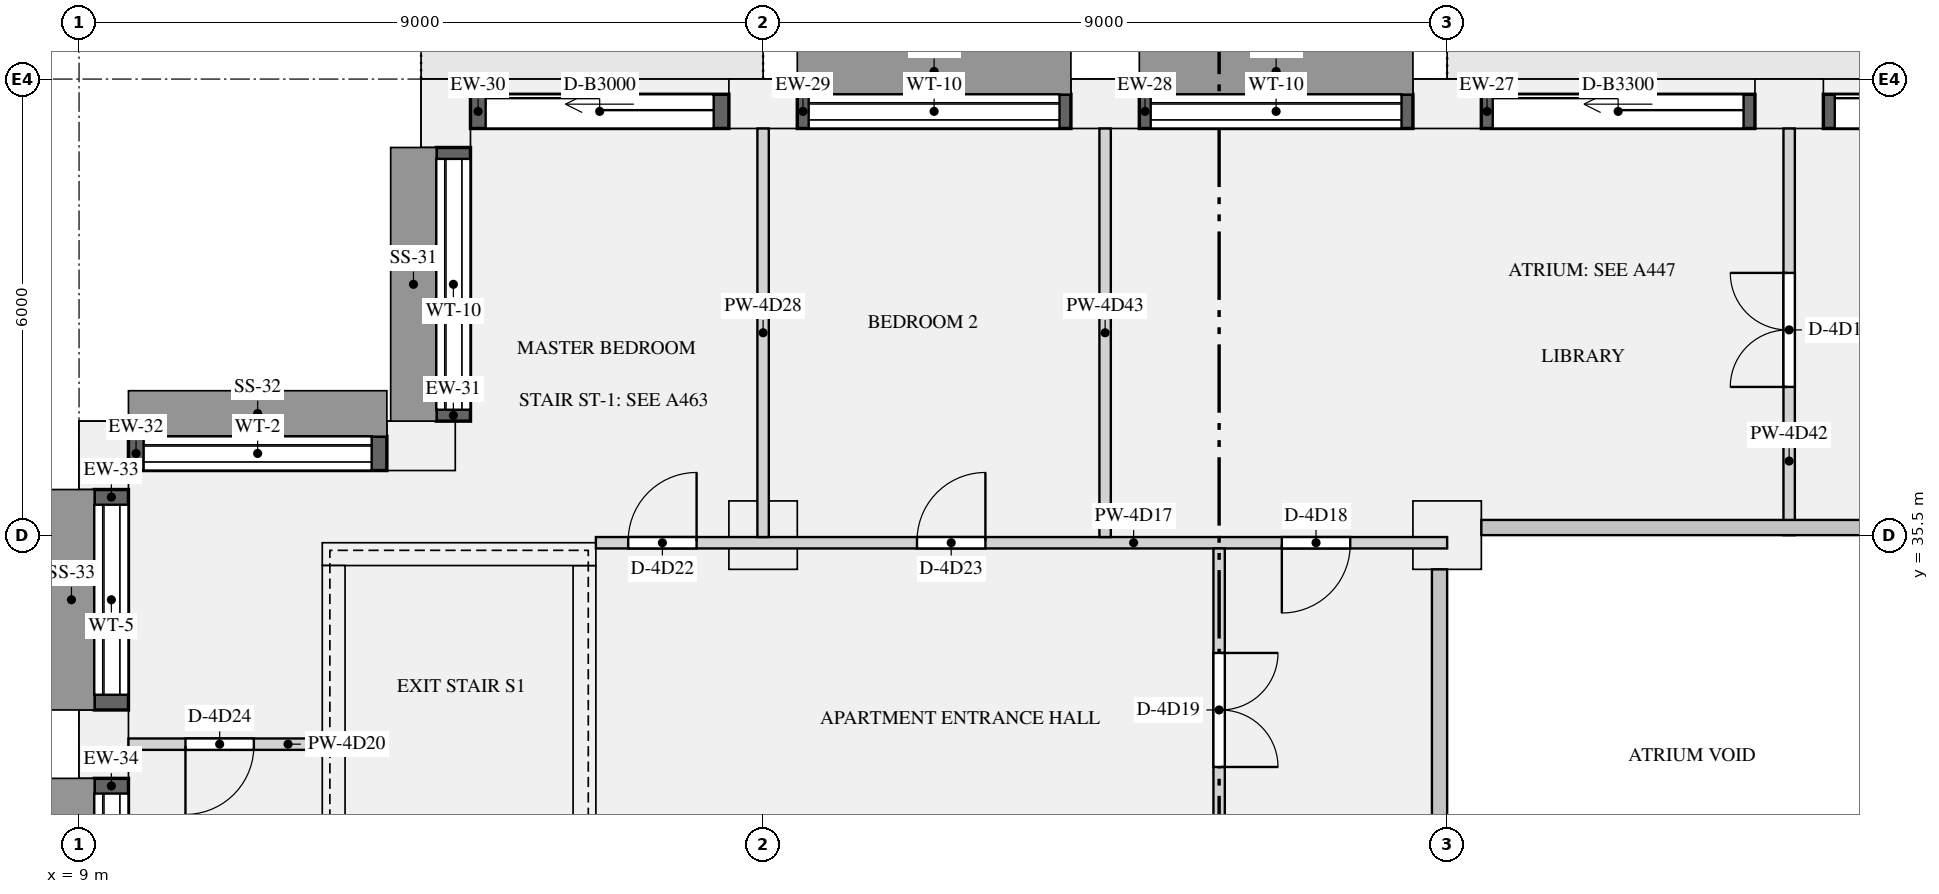
"""IFC4 building model, lengths in metres.
Left out: names, types, materials, properties, quantities, classifications, styles, units other than length and angle.
Written with IfcOpenShell. Run it as: python <this file> out.ifc"""

import sys

from ifc_helpers import new_model, si_unit, direction, frame, frame_2d, origin, origin_2d, place, context, subcontext, project, spatial, rectangle, extrude, element, fill, save


model = new_model("IFC4")
c1 = context("Model", 3, precision=1e-05, world=origin(), true_north=direction((0.0, 1.0)))
c2 = subcontext(c1, "Body", "Model", "MODEL_VIEW")
j1 = project(units=[si_unit("LENGTHUNIT", "METRE"), si_unit("PLANEANGLEUNIT", "RADIAN")], contexts=[c1])
p1 = place(None, origin())
s1 = spatial("IfcSite", under=j1, at=p1, CompositionType="ELEMENT")
p2 = place(p1, origin())
s2 = spatial("IfcBuilding", under=s1, at=p2, CompositionType="ELEMENT")
p3 = place(p2, frame((0.0, 0.0, 223.2)))
s3 = spatial("IfcBuildingStorey", under=s2, at=p3, CompositionType="ELEMENT", Elevation=223.2)
for number, where, z_axis, x_axis in (
    (1, (31.5, 41.175, 0.0), (0.0, 0.0, 1.0), (-1.0, 0.0, 0.0)),
    (2, (27.0, 41.175, 0.0), (0.0, 0.0, 1.0), (-1.0, 0.0, 0.0)),
    (3, (22.5, 41.175, 0.0), (0.0, 0.0, 1.0), (-1.0, 0.0, 0.0)),
    (4, (18.0, 41.175, 0.0), (0.0, 0.0, 1.0), (-1.0, 0.0, 0.0)),
    (5, (13.825, 41.05, 0.0), (0.0, 0.0, 1.0), (0.0, -1.0, 0.0)),
    (6, (13.5, 36.675, 0.0), (0.0, 0.0, 1.0), (-1.0, 0.0, 0.0)),
    (7, (9.325, 36.55, 0.0), (0.0, 0.0, 1.0), (0.0, -1.0, 0.0)),
    (8, (9.325, 32.75, 0.0), (0.0, 0.0, 1.0), (0.0, -1.0, 0.0)),
):
    element("IfcColumn", number, at=place(p3, frame(where, z_axis=z_axis, x_axis=x_axis)), inside=s3, PredefinedType="USERDEFINED", context=c2, shape_type="SweptSolid", body=[
        extrude(rectangle(XDim=0.9, YDim=0.65, at=origin_2d()), origin(), (0.0, 0.0, 1.0), 3.15),
    ])
for number, where, z_axis, x_axis in (
    (9, (18.0, 35.5, 0.0), (0.0, 0.0, 1.0), (1.0, 0.0, 0.0)),
    (10, (27.0, 35.5, 0.0), (0.0, 0.0, 1.0), (1.0, 0.0, 0.0)),
):
    element("IfcColumn", number, at=place(p3, frame(where, z_axis=z_axis, x_axis=x_axis)), inside=s3, PredefinedType="COLUMN", context=c2, shape_type="SweptSolid", body=[
        extrude(rectangle(XDim=0.9, YDim=0.9, at=origin_2d()), origin(), (0.0, 0.0, 1.0), 3.15),
    ])
p4 = place(p3, frame((12.2, 35.25, 0.0), z_axis=(0.0, 0.0, 1.0), x_axis=(1.0, 0.0, 0.0)))
e11 = element("IfcWall", 11, at=p4, inside=s3, PredefinedType="SHEAR", context=c2, shape_type="SweptSolid", body=[
    extrude(rectangle(XDim=3.6, YDim=0.3, at=frame_2d((1.8, 0.0))), origin(), (0.0, 0.0, 1.0), 3.15),
])
for number, where, z_axis, x_axis in (
    (12, (12.35, 27.3, 0.0), (0.0, 0.0, 1.0), (0.0, 1.0, 0.0)),
    (13, (15.65, 27.3, 0.0), (0.0, 0.0, 1.0), (0.0, 1.0, 0.0)),
):
    element("IfcWall", number, at=place(p3, frame(where, z_axis=z_axis, x_axis=x_axis)), inside=s3, PredefinedType="SHEAR", context=c2, shape_type="SweptSolid", body=[
        extrude(rectangle(XDim=7.8, YDim=0.3, at=frame_2d((3.9, 0.0))), origin(), (0.0, 0.0, 1.0), 3.15),
    ])
p5 = place(p3, frame((35.55, 41.075, 0.0), z_axis=(0.0, 0.0, 1.0), x_axis=(-1.0, 0.0, 0.0)))
e14 = element("IfcWall", 14, at=p5, inside=s3, PredefinedType="SOLIDWALL", context=c2, shape_type="SweptSolid", body=[
    extrude(rectangle(XDim=3.6, YDim=0.45, at=frame_2d((1.8, 0.0))), origin(), (0.0, 0.0, 1.0), 2.83),
])
p6 = place(p5, frame((0.15, 0.0, 0.0)))
e15 = element("IfcOpeningElement", 15, at=p6, cuts=e14, PredefinedType="OPENING", context=c2, shape_type="SweptSolid", body=[
    extrude(rectangle(XDim=3.3, YDim=2.3, at=frame_2d((1.65, 1.15))), frame((0.0, 0.235, 0.0), z_axis=(0.0, -1.0, 0.0), x_axis=(1.0, 0.0, 0.0)), (0.0, 0.0, 1.0), 0.47),
])
p7 = place(p3, frame((31.05, 41.075, 0.0), z_axis=(0.0, 0.0, 1.0), x_axis=(-1.0, 0.0, 0.0)))
e16 = element("IfcWall", 16, at=p7, inside=s3, PredefinedType="SOLIDWALL", context=c2, shape_type="SweptSolid", body=[
    extrude(rectangle(XDim=3.6, YDim=0.45, at=frame_2d((1.8, 0.0))), origin(), (0.0, 0.0, 1.0), 2.83),
])
p8 = place(p7, frame((0.15, 0.0, 0.0)))
e17 = element("IfcOpeningElement", 17, at=p8, cuts=e16, PredefinedType="OPENING", context=c2, shape_type="SweptSolid", body=[
    extrude(rectangle(XDim=3.3, YDim=2.3, at=frame_2d((1.65, 1.15))), frame((0.0, 0.235, 0.0), z_axis=(0.0, -1.0, 0.0), x_axis=(1.0, 0.0, 0.0)), (0.0, 0.0, 1.0), 0.47),
])
p9 = place(p3, frame((26.55, 41.075, 0.9), z_axis=(0.0, 0.0, 1.0), x_axis=(-1.0, 0.0, 0.0)))
e18 = element("IfcWall", 18, at=p9, inside=s3, PredefinedType="SOLIDWALL", context=c2, shape_type="SweptSolid", body=[
    extrude(rectangle(XDim=3.6, YDim=0.45, at=frame_2d((1.8, 0.0))), origin(), (0.0, 0.0, 1.0), 1.93),
])
p10 = place(p9, frame((0.15, 0.0, 0.15)))
e19 = element("IfcOpeningElement", 19, at=p10, cuts=e18, PredefinedType="OPENING", context=c2, shape_type="SweptSolid", body=[
    extrude(rectangle(XDim=3.3, YDim=1.5, at=frame_2d((1.65, 0.75))), frame((0.0, 0.235, 0.0), z_axis=(0.0, -1.0, 0.0), x_axis=(1.0, 0.0, 0.0)), (0.0, 0.0, 1.0), 0.47),
])
p11 = place(p3, frame((22.05, 41.075, 0.9), z_axis=(0.0, 0.0, 1.0), x_axis=(-1.0, 0.0, 0.0)))
e20 = element("IfcWall", 20, at=p11, inside=s3, PredefinedType="SOLIDWALL", context=c2, shape_type="SweptSolid", body=[
    extrude(rectangle(XDim=3.6, YDim=0.45, at=frame_2d((1.8, 0.0))), origin(), (0.0, 0.0, 1.0), 1.93),
])
p12 = place(p11, frame((0.15, 0.0, 0.15)))
e21 = element("IfcOpeningElement", 21, at=p12, cuts=e20, PredefinedType="OPENING", context=c2, shape_type="SweptSolid", body=[
    extrude(rectangle(XDim=3.3, YDim=1.5, at=frame_2d((1.65, 0.75))), frame((0.0, 0.235, 0.0), z_axis=(0.0, -1.0, 0.0), x_axis=(1.0, 0.0, 0.0)), (0.0, 0.0, 1.0), 0.47),
])
p13 = place(p3, frame((17.55, 41.075, 0.0), z_axis=(0.0, 0.0, 1.0), x_axis=(-1.0, 0.0, 0.0)))
e22 = element("IfcWall", 22, at=p13, inside=s3, PredefinedType="SOLIDWALL", context=c2, shape_type="SweptSolid", body=[
    extrude(rectangle(XDim=3.4, YDim=0.45, at=frame_2d((1.7, 0.0))), origin(), (0.0, 0.0, 1.0), 2.83),
])
p14 = place(p13, frame((0.2, 0.0, 0.0)))
e23 = element("IfcOpeningElement", 23, at=p14, cuts=e22, PredefinedType="OPENING", context=c2, shape_type="SweptSolid", body=[
    extrude(rectangle(XDim=3.0, YDim=2.3, at=frame_2d((1.5, 1.15))), frame((0.0, 0.235, 0.0), z_axis=(0.0, -1.0, 0.0), x_axis=(1.0, 0.0, 0.0)), (0.0, 0.0, 1.0), 0.47),
])
p15 = place(p3, frame((13.925, 40.6, 0.9), z_axis=(0.0, 0.0, 1.0), x_axis=(0.0, -1.0, 0.0)))
e24 = element("IfcWall", 24, at=p15, inside=s3, PredefinedType="SOLIDWALL", context=c2, shape_type="SweptSolid", body=[
    extrude(rectangle(XDim=3.6, YDim=0.45, at=frame_2d((1.8, 0.0))), origin(), (0.0, 0.0, 1.0), 1.93),
])
p16 = place(p15, frame((0.15, 0.0, 0.15)))
e25 = element("IfcOpeningElement", 25, at=p16, cuts=e24, PredefinedType="OPENING", context=c2, shape_type="SweptSolid", body=[
    extrude(rectangle(XDim=3.3, YDim=1.5, at=frame_2d((1.65, 0.75))), frame((0.0, 0.235, 0.0), z_axis=(0.0, -1.0, 0.0), x_axis=(1.0, 0.0, 0.0)), (0.0, 0.0, 1.0), 0.47),
])
p17 = place(p3, frame((13.05, 36.575, 0.9), z_axis=(0.0, 0.0, 1.0), x_axis=(-1.0, 0.0, 0.0)))
e26 = element("IfcWall", 26, at=p17, inside=s3, PredefinedType="SOLIDWALL", context=c2, shape_type="SweptSolid", body=[
    extrude(rectangle(XDim=3.4, YDim=0.45, at=frame_2d((1.7, 0.0))), origin(), (0.0, 0.0, 1.0), 1.93),
])
p18 = place(p17, frame((0.2, 0.0, 0.15)))
e27 = element("IfcOpeningElement", 27, at=p18, cuts=e26, PredefinedType="OPENING", context=c2, shape_type="SweptSolid", body=[
    extrude(rectangle(XDim=3.0, YDim=1.5, at=frame_2d((1.5, 0.75))), frame((0.0, 0.235, 0.0), z_axis=(0.0, -1.0, 0.0), x_axis=(1.0, 0.0, 0.0)), (0.0, 0.0, 1.0), 0.47),
])
p19 = place(p3, frame((9.425, 36.1, 0.9), z_axis=(0.0, 0.0, 1.0), x_axis=(0.0, -1.0, 0.0)))
e28 = element("IfcWall", 28, at=p19, inside=s3, PredefinedType="SOLIDWALL", context=c2, shape_type="SweptSolid", body=[
    extrude(rectangle(XDim=2.9, YDim=0.45, at=frame_2d((1.45, 0.0))), origin(), (0.0, 0.0, 1.0), 1.93),
])
p20 = place(p19, frame((0.2, 0.0, 0.15)))
e29 = element("IfcOpeningElement", 29, at=p20, cuts=e28, PredefinedType="OPENING", context=c2, shape_type="SweptSolid", body=[
    extrude(rectangle(XDim=2.5, YDim=1.5, at=frame_2d((1.25, 0.75))), frame((0.0, 0.235, 0.0), z_axis=(0.0, -1.0, 0.0), x_axis=(1.0, 0.0, 0.0)), (0.0, 0.0, 1.0), 0.47),
])
p21 = place(p3, frame((9.425, 32.3, 0.9), z_axis=(0.0, 0.0, 1.0), x_axis=(0.0, -1.0, 0.0)))
e30 = element("IfcWall", 30, at=p21, inside=s3, PredefinedType="SOLIDWALL", context=c2, shape_type="SweptSolid", body=[
    extrude(rectangle(XDim=3.15, YDim=0.45, at=frame_2d((1.575, 0.0))), origin(), (0.0, 0.0, 1.0), 1.93),
])
p22 = place(p21, frame((0.2, 0.0, 0.15)))
e31 = element("IfcOpeningElement", 31, at=p22, cuts=e30, PredefinedType="OPENING", context=c2, shape_type="SweptSolid", body=[
    extrude(rectangle(XDim=2.75, YDim=1.5, at=frame_2d((1.375, 0.75))), frame((0.0, 0.235, 0.0), z_axis=(0.0, -1.0, 0.0), x_axis=(1.0, 0.0, 0.0)), (0.0, 0.0, 1.0), 0.47),
])
p23 = place(p3, frame((15.8, 35.4, 0.0), z_axis=(0.0, 0.0, 1.0), x_axis=(1.0, 0.0, 0.0)))
e32 = element("IfcWall", 32, at=p23, inside=s3, PredefinedType="PARTITIONING", context=c2, shape_type="SweptSolid", body=[
    extrude(rectangle(XDim=11.2, YDim=0.15, at=frame_2d((5.6, 0.0))), origin(), (0.0, 0.0, 1.0), 2.83),
])
p24 = place(p23, frame((9.025, 0.0, 0.0)))
e33 = element("IfcOpeningElement", 33, at=p24, cuts=e32, PredefinedType="OPENING", context=c2, shape_type="SweptSolid", body=[
    extrude(rectangle(XDim=0.9, YDim=2.1, at=frame_2d((0.45, 1.05))), frame((0.0, 0.085, 0.0), z_axis=(0.0, -1.0, 0.0), x_axis=(1.0, 0.0, 0.0)), (0.0, 0.0, 1.0), 0.17),
])
p25 = place(p23, frame((0.425, 0.0, 0.0)))
e34 = element("IfcOpeningElement", 34, at=p25, cuts=e32, PredefinedType="OPENING", context=c2, shape_type="SweptSolid", body=[
    extrude(rectangle(XDim=0.9, YDim=2.1, at=frame_2d((0.45, 1.05))), frame((0.0, 0.085, 0.0), z_axis=(0.0, -1.0, 0.0), x_axis=(1.0, 0.0, 0.0)), (0.0, 0.0, 1.0), 0.17),
])
p26 = place(p23, frame((4.225, 0.0, 0.0)))
e35 = element("IfcOpeningElement", 35, at=p26, cuts=e32, PredefinedType="OPENING", context=c2, shape_type="SweptSolid", body=[
    extrude(rectangle(XDim=0.9, YDim=2.1, at=frame_2d((0.45, 1.05))), frame((0.0, 0.085, 0.0), z_axis=(0.0, -1.0, 0.0), x_axis=(1.0, 0.0, 0.0)), (0.0, 0.0, 1.0), 0.17),
])
p27 = place(p3, frame((9.65, 32.75, 0.0), z_axis=(0.0, 0.0, 1.0), x_axis=(1.0, 0.0, 0.0)))
e36 = element("IfcWall", 36, at=p27, inside=s3, PredefinedType="PARTITIONING", context=c2, shape_type="SweptSolid", body=[
    extrude(rectangle(XDim=2.55, YDim=0.15, at=frame_2d((1.275, 0.0))), origin(), (0.0, 0.0, 1.0), 2.83),
])
p28 = place(p27, frame((0.75, 0.0, 0.0)))
e37 = element("IfcOpeningElement", 37, at=p28, cuts=e36, PredefinedType="OPENING", context=c2, shape_type="SweptSolid", body=[
    extrude(rectangle(XDim=0.9, YDim=2.1, at=frame_2d((0.45, 1.05))), frame((0.0, 0.085, 0.0), z_axis=(0.0, -1.0, 0.0), x_axis=(1.0, 0.0, 0.0)), (0.0, 0.0, 1.0), 0.17),
])
p29 = place(p3, frame((18.0, 35.475, 0.0), z_axis=(0.0, 0.0, 1.0), x_axis=(0.0, 1.0, 0.0)))
e38 = element("IfcWall", 38, at=p29, inside=s3, PredefinedType="PARTITIONING", context=c2, shape_type="SweptSolid", body=[
    extrude(rectangle(XDim=5.375, YDim=0.15, at=frame_2d((2.688, 0.0))), origin(), (0.0, 0.0, 1.0), 2.83),
])
p30 = place(p3, frame((24.0, 27.1, 0.0), z_axis=(0.0, 0.0, 1.0), x_axis=(0.0, 1.0, 0.0)))
e39 = element("IfcWall", 39, at=p30, inside=s3, PredefinedType="PARTITIONING", context=c2, shape_type="SweptSolid", body=[
    extrude(rectangle(XDim=8.225, YDim=0.15, at=frame_2d((4.112, 0.0))), origin(), (0.0, 0.0, 1.0), 2.83),
])
p31 = place(p30, frame((5.35, 0.0, 0.0)))
e40 = element("IfcOpeningElement", 40, at=p31, cuts=e39, PredefinedType="OPENING", context=c2, shape_type="SweptSolid", body=[
    extrude(rectangle(XDim=1.5, YDim=2.1, at=frame_2d((0.75, 1.05))), frame((0.0, 0.085, 0.0), z_axis=(0.0, -1.0, 0.0), x_axis=(1.0, 0.0, 0.0)), (0.0, 0.0, 1.0), 0.17),
])
p32 = place(p30, frame((1.45, 0.0, 0.0)))
e41 = element("IfcOpeningElement", 41, at=p32, cuts=e39, PredefinedType="OPENING", context=c2, shape_type="SweptSolid", body=[
    extrude(rectangle(XDim=0.9, YDim=2.1, at=frame_2d((0.45, 1.05))), frame((0.0, 0.085, 0.0), z_axis=(0.0, -1.0, 0.0), x_axis=(1.0, 0.0, 0.0)), (0.0, 0.0, 1.0), 0.17),
])
p33 = place(p3, frame((31.5, 35.5, 0.0), z_axis=(0.0, 0.0, 1.0), x_axis=(0.0, 1.0, 0.0)))
e42 = element("IfcWall", 42, at=p33, inside=s3, PredefinedType="PARTITIONING", context=c2, shape_type="SweptSolid", body=[
    extrude(rectangle(XDim=5.35, YDim=0.15, at=frame_2d((2.675, 0.0))), origin(), (0.0, 0.0, 1.0), 2.83),
])
p34 = place(p33, frame((1.95, 0.0, 0.0)))
e43 = element("IfcOpeningElement", 43, at=p34, cuts=e42, PredefinedType="OPENING", context=c2, shape_type="SweptSolid", body=[
    extrude(rectangle(XDim=1.5, YDim=2.1, at=frame_2d((0.75, 1.05))), frame((0.0, 0.085, 0.0), z_axis=(0.0, -1.0, 0.0), x_axis=(1.0, 0.0, 0.0)), (0.0, 0.0, 1.0), 0.17),
])
p35 = place(p3, frame((22.5, 35.475, 0.0), z_axis=(0.0, 0.0, 1.0), x_axis=(0.0, 1.0, 0.0)))
e44 = element("IfcWall", 44, at=p35, inside=s3, PredefinedType="PARTITIONING", context=c2, shape_type="SweptSolid", body=[
    extrude(rectangle(XDim=5.375, YDim=0.15, at=frame_2d((2.688, 0.0))), origin(), (0.0, 0.0, 1.0), 2.83),
])
p36 = place(p6, origin())
e45 = element("IfcDoor", 45, at=p36, inside=s3, OperationType="SLIDING_TO_LEFT", PredefinedType="DOOR", context=c2, shape_type="SweptSolid", body=[
    extrude(rectangle(XDim=3.3, YDim=2.3, at=frame_2d((1.65, 1.15))), frame((0.0, -0.07, 0.0), z_axis=(0.0, -1.0, 0.0), x_axis=(1.0, 0.0, 0.0)), (0.0, 0.0, 1.0), 0.05),
])
fill(e15, e45)
p37 = place(p8, origin())
e46 = element("IfcDoor", 46, at=p37, inside=s3, OperationType="SLIDING_TO_LEFT", PredefinedType="DOOR", context=c2, shape_type="SweptSolid", body=[
    extrude(rectangle(XDim=3.3, YDim=2.3, at=frame_2d((1.65, 1.15))), frame((0.0, -0.07, 0.0), z_axis=(0.0, -1.0, 0.0), x_axis=(1.0, 0.0, 0.0)), (0.0, 0.0, 1.0), 0.05),
])
fill(e17, e46)
p38 = place(p10, origin())
e47 = element("IfcWindow", 47, at=p38, inside=s3, PartitioningType="SINGLE_PANEL", PredefinedType="WINDOW", context=c2, shape_type="SweptSolid", body=[
    extrude(rectangle(XDim=3.3, YDim=1.5, at=frame_2d((1.65, 0.75))), frame((0.0, -0.065, 0.0), z_axis=(0.0, -1.0, 0.0), x_axis=(1.0, 0.0, 0.0)), (0.0, 0.0, 1.0), 0.06),
])
fill(e19, e47)
p39 = place(p12, origin())
e48 = element("IfcWindow", 48, at=p39, inside=s3, PartitioningType="SINGLE_PANEL", PredefinedType="WINDOW", context=c2, shape_type="SweptSolid", body=[
    extrude(rectangle(XDim=3.3, YDim=1.5, at=frame_2d((1.65, 0.75))), frame((0.0, -0.065, 0.0), z_axis=(0.0, -1.0, 0.0), x_axis=(1.0, 0.0, 0.0)), (0.0, 0.0, 1.0), 0.06),
])
fill(e21, e48)
p40 = place(p14, origin())
e49 = element("IfcDoor", 49, at=p40, inside=s3, OperationType="SLIDING_TO_LEFT", PredefinedType="DOOR", context=c2, shape_type="SweptSolid", body=[
    extrude(rectangle(XDim=3.0, YDim=2.3, at=frame_2d((1.5, 1.15))), frame((0.0, -0.07, 0.0), z_axis=(0.0, -1.0, 0.0), x_axis=(1.0, 0.0, 0.0)), (0.0, 0.0, 1.0), 0.05),
])
fill(e23, e49)
p41 = place(p16, origin())
e50 = element("IfcWindow", 50, at=p41, inside=s3, PartitioningType="SINGLE_PANEL", PredefinedType="WINDOW", context=c2, shape_type="SweptSolid", body=[
    extrude(rectangle(XDim=3.3, YDim=1.5, at=frame_2d((1.65, 0.75))), frame((0.0, -0.065, 0.0), z_axis=(0.0, -1.0, 0.0), x_axis=(1.0, 0.0, 0.0)), (0.0, 0.0, 1.0), 0.06),
])
fill(e25, e50)
p42 = place(p18, origin())
e51 = element("IfcWindow", 51, at=p42, inside=s3, PartitioningType="SINGLE_PANEL", PredefinedType="WINDOW", context=c2, shape_type="SweptSolid", body=[
    extrude(rectangle(XDim=3.0, YDim=1.5, at=frame_2d((1.5, 0.75))), frame((0.0, -0.065, 0.0), z_axis=(0.0, -1.0, 0.0), x_axis=(1.0, 0.0, 0.0)), (0.0, 0.0, 1.0), 0.06),
])
fill(e27, e51)
p43 = place(p20, origin())
e52 = element("IfcWindow", 52, at=p43, inside=s3, PartitioningType="SINGLE_PANEL", PredefinedType="WINDOW", context=c2, shape_type="SweptSolid", body=[
    extrude(rectangle(XDim=2.5, YDim=1.5, at=frame_2d((1.25, 0.75))), frame((0.0, -0.065, 0.0), z_axis=(0.0, -1.0, 0.0), x_axis=(1.0, 0.0, 0.0)), (0.0, 0.0, 1.0), 0.06),
])
fill(e29, e52)
p44 = place(p22, origin())
e53 = element("IfcWindow", 53, at=p44, inside=s3, PartitioningType="SINGLE_PANEL", PredefinedType="WINDOW", context=c2, shape_type="SweptSolid", body=[
    extrude(rectangle(XDim=2.75, YDim=1.5, at=frame_2d((1.375, 0.75))), frame((0.0, -0.065, 0.0), z_axis=(0.0, -1.0, 0.0), x_axis=(1.0, 0.0, 0.0)), (0.0, 0.0, 1.0), 0.06),
])
fill(e31, e53)
p45 = place(p34, origin())
e54 = element("IfcDoor", 54, at=p45, inside=s3, OperationType="DOUBLE_DOOR_SINGLE_SWING", PredefinedType="DOOR", context=c2, shape_type="SweptSolid", body=[
    extrude(rectangle(XDim=1.5, YDim=2.1, at=frame_2d((0.75, 1.05))), frame((0.0, 0.025, 0.0), z_axis=(0.0, -1.0, 0.0), x_axis=(1.0, 0.0, 0.0)), (0.0, 0.0, 1.0), 0.05),
])
fill(e43, e54)
p46 = place(p24, frame((0.9, 0.0, 0.0), z_axis=(0.0, 0.0, 1.0), x_axis=(-1.0, 0.0, 0.0)))
e55 = element("IfcDoor", 55, at=p46, inside=s3, OperationType="SINGLE_SWING_RIGHT", PredefinedType="DOOR", context=c2, shape_type="SweptSolid", body=[
    extrude(rectangle(XDim=0.9, YDim=2.1, at=frame_2d((0.45, 1.05))), frame((0.0, 0.025, 0.0), z_axis=(0.0, -1.0, 0.0), x_axis=(1.0, 0.0, 0.0)), (0.0, 0.0, 1.0), 0.05),
])
fill(e33, e55)
p47 = place(p31, frame((1.5, 0.0, 0.0), z_axis=(0.0, 0.0, 1.0), x_axis=(-1.0, 0.0, 0.0)))
e56 = element("IfcDoor", 56, at=p47, inside=s3, OperationType="DOUBLE_DOOR_SINGLE_SWING", PredefinedType="DOOR", context=c2, shape_type="SweptSolid", body=[
    extrude(rectangle(XDim=1.5, YDim=2.1, at=frame_2d((0.75, 1.05))), frame((0.0, 0.025, 0.0), z_axis=(0.0, -1.0, 0.0), x_axis=(1.0, 0.0, 0.0)), (0.0, 0.0, 1.0), 0.05),
])
fill(e40, e56)
p48 = place(p25, origin())
e57 = element("IfcDoor", 57, at=p48, inside=s3, OperationType="SINGLE_SWING_RIGHT", PredefinedType="DOOR", context=c2, shape_type="SweptSolid", body=[
    extrude(rectangle(XDim=0.9, YDim=2.1, at=frame_2d((0.45, 1.05))), frame((0.0, 0.025, 0.0), z_axis=(0.0, -1.0, 0.0), x_axis=(1.0, 0.0, 0.0)), (0.0, 0.0, 1.0), 0.05),
])
fill(e34, e57)
p49 = place(p26, origin())
e58 = element("IfcDoor", 58, at=p49, inside=s3, OperationType="SINGLE_SWING_RIGHT", PredefinedType="DOOR", context=c2, shape_type="SweptSolid", body=[
    extrude(rectangle(XDim=0.9, YDim=2.1, at=frame_2d((0.45, 1.05))), frame((0.0, 0.025, 0.0), z_axis=(0.0, -1.0, 0.0), x_axis=(1.0, 0.0, 0.0)), (0.0, 0.0, 1.0), 0.05),
])
fill(e35, e58)
p50 = place(p28, frame((0.9, 0.0, 0.0), z_axis=(0.0, 0.0, 1.0), x_axis=(-1.0, 0.0, 0.0)))
e59 = element("IfcDoor", 59, at=p50, inside=s3, OperationType="SINGLE_SWING_RIGHT", PredefinedType="DOOR", context=c2, shape_type="SweptSolid", body=[
    extrude(rectangle(XDim=0.9, YDim=2.1, at=frame_2d((0.45, 1.05))), frame((0.0, 0.025, 0.0), z_axis=(0.0, -1.0, 0.0), x_axis=(1.0, 0.0, 0.0)), (0.0, 0.0, 1.0), 0.05),
])
fill(e37, e59)
save(model, sys.argv[1])
